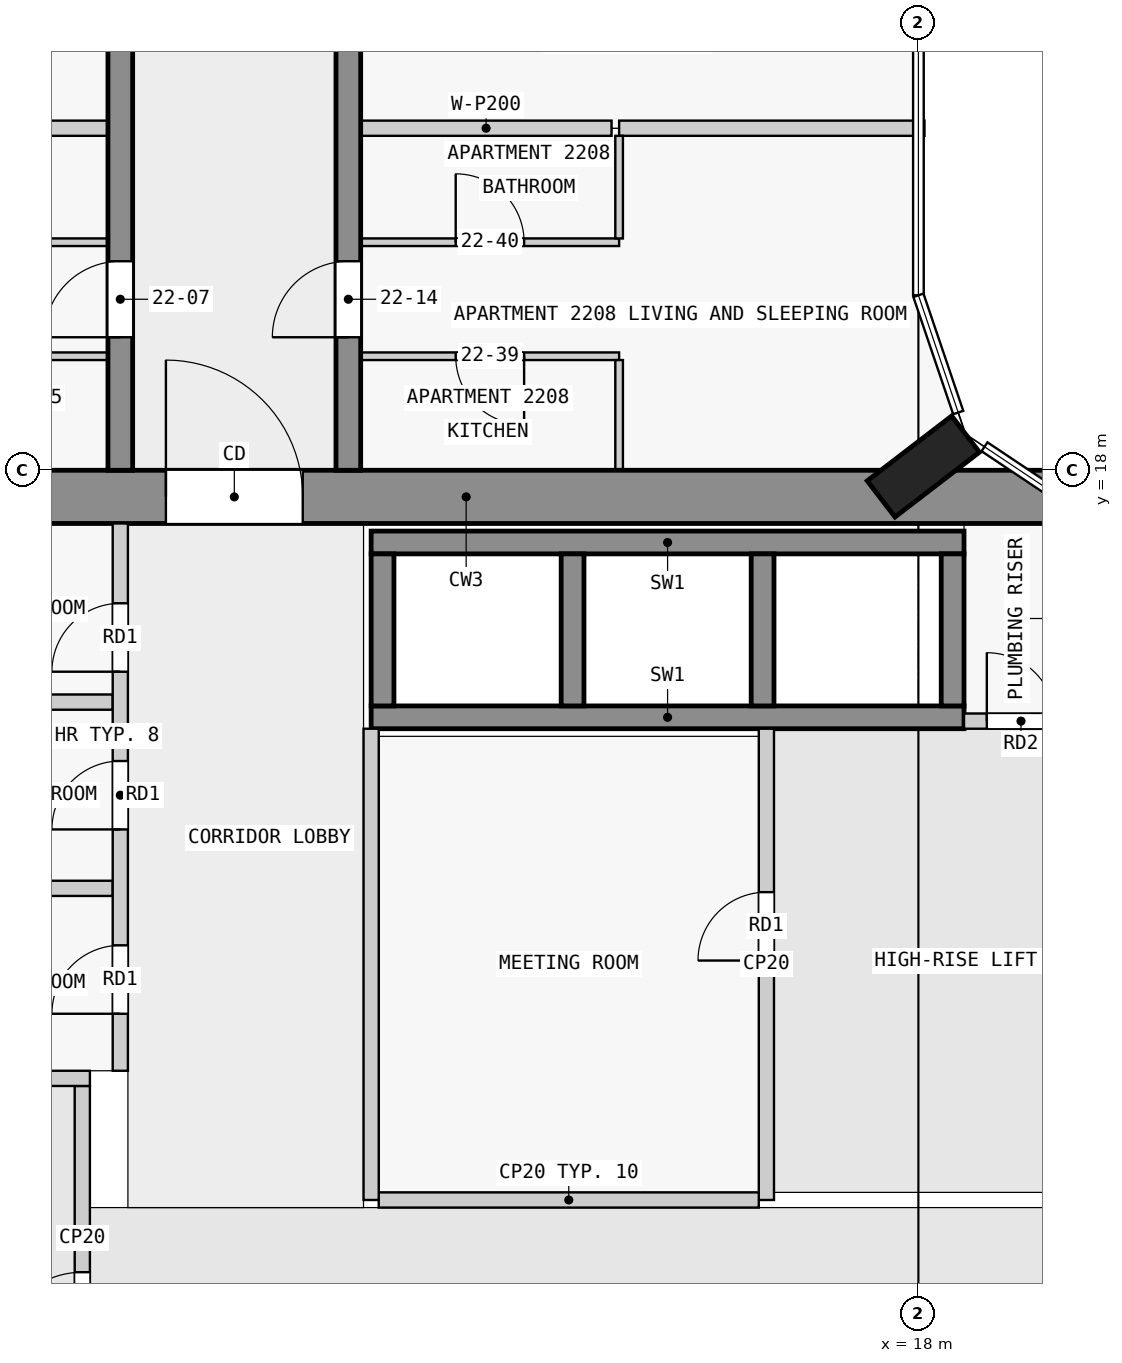
"""IFC4 building model, lengths in metres.
Left out: names, types, materials, properties, quantities, classifications, styles, units other than length and angle.
Written with IfcOpenShell. Run it as: python <this file> out.ifc"""

import sys

from ifc_helpers import new_model, si_unit, direction, frame, frame_2d, origin, origin_2d, place, context, subcontext, project, spatial, rectangle, extrude, element, fill, save


model = new_model("IFC4")
c1 = context("Model", 3, precision=1e-05, world=origin(), true_north=direction((0.0, 1.0)))
c2 = subcontext(c1, "Body", "Model", "MODEL_VIEW")
j1 = project(units=[si_unit("LENGTHUNIT", "METRE"), si_unit("PLANEANGLEUNIT", "RADIAN")], contexts=[c1])
p1 = place(None, origin())
s1 = spatial("IfcSite", under=j1, at=p1, CompositionType="ELEMENT")
p2 = place(p1, origin())
s2 = spatial("IfcBuilding", under=s1, at=p2, CompositionType="ELEMENT")
p3 = place(p2, frame((0.0, 0.0, 88.8)))
s3 = spatial("IfcBuildingStorey", under=s2, at=p3, CompositionType="ELEMENT", Elevation=88.8)
p4 = place(p3, frame((18.065, 18.05, 0.0), z_axis=(0.0, 0.0, 1.0), x_axis=(-0.608810846443, 0.793315418515, 0.0)))
e1 = element("IfcColumn", 1, at=p4, inside=s3, PredefinedType="COLUMN", context=c2, shape_type="SweptSolid", body=[
    extrude(rectangle(XDim=0.6, YDim=1.4, at=origin_2d()), origin(), (0.0, 0.0, 1.0), 3.5),
])
p5 = place(p3, frame((1.6, 17.65, 0.0), z_axis=(0.0, 0.0, 1.0), x_axis=(1.0, 0.0, 0.0)))
e2 = element("IfcWall", 2, at=p5, inside=s3, PredefinedType="SHEAR", context=c2, shape_type="SweptSolid", body=[
    extrude(rectangle(XDim=20.9, YDim=0.7, at=frame_2d((10.45, 0.0))), origin(), (0.0, 0.0, 1.0), 3.25),
])
p6 = place(p5, frame((6.5, 0.0, 0.0)))
e3 = element("IfcOpeningElement", 3, at=p6, cuts=e2, PredefinedType="OPENING", context=c2, shape_type="SweptSolid", body=[
    extrude(rectangle(XDim=1.8, YDim=2.1, at=frame_2d((0.9, 1.05))), frame((0.0, 0.36, 0.0), z_axis=(0.0, -1.0, 0.0), x_axis=(1.0, 0.0, 0.0)), (0.0, 0.0, 1.0), 0.72),
])
for number, where, z_axis, x_axis in (
    (4, (10.8, 17.05, 0.0), (0.0, 0.0, 1.0), (1.0, 0.0, 0.0)),
    (5, (10.8, 14.75, 0.0), (0.0, 0.0, 1.0), (1.0, 0.0, 0.0)),
):
    element("IfcWall", number, at=place(p3, frame(where, z_axis=z_axis, x_axis=x_axis)), inside=s3, PredefinedType="SHEAR", context=c2, shape_type="SweptSolid", body=[
        extrude(rectangle(XDim=7.8, YDim=0.3, at=frame_2d((3.9, 0.0))), origin(), (0.0, 0.0, 1.0), 3.25),
    ])
for number, where, z_axis, x_axis in (
    (6, (10.95, 14.9, 0.0), (0.0, 0.0, 1.0), (0.0, 1.0, 0.0)),
    (7, (13.45, 14.9, 0.0), (0.0, 0.0, 1.0), (0.0, 1.0, 0.0)),
    (8, (15.95, 14.9, 0.0), (0.0, 0.0, 1.0), (0.0, 1.0, 0.0)),
    (9, (18.45, 14.9, 0.0), (0.0, 0.0, 1.0), (0.0, 1.0, 0.0)),
):
    element("IfcWall", number, at=place(p3, frame(where, z_axis=z_axis, x_axis=x_axis)), inside=s3, PredefinedType="SHEAR", context=c2, shape_type="SweptSolid", body=[
        extrude(rectangle(XDim=2.0, YDim=0.3, at=frame_2d((1.0, 0.0))), origin(), (0.0, 0.0, 1.0), 3.25),
    ])
p7 = place(p3, frame((7.5, 18.0, 0.0), z_axis=(0.0, 0.0, 1.0), x_axis=(0.0, 1.0, 0.0)))
e10 = element("IfcWall", 10, at=p7, inside=s3, PredefinedType="SHEAR", context=c2, shape_type="SweptSolid", body=[
    extrude(rectangle(XDim=27.0, YDim=0.325, at=frame_2d((13.5, 0.0))), origin(), (0.0, 0.0, 1.0), 3.25),
])
p8 = place(p7, frame((1.75, 0.0, 0.0)))
e11 = element("IfcOpeningElement", 11, at=p8, cuts=e10, PredefinedType="OPENING", context=c2, shape_type="SweptSolid", body=[
    extrude(rectangle(XDim=1.0, YDim=2.1, at=frame_2d((0.5, 1.05))), frame((0.0, 0.172, 0.0), z_axis=(0.0, -1.0, 0.0), x_axis=(1.0, 0.0, 0.0)), (0.0, 0.0, 1.0), 0.345),
])
p9 = place(p7, frame((6.25, 0.0, 0.0)))
e12 = element("IfcOpeningElement", 12, at=p9, cuts=e10, PredefinedType="OPENING", context=c2, shape_type="SweptSolid", body=[
    extrude(rectangle(XDim=1.0, YDim=2.1, at=frame_2d((0.5, 1.05))), frame((0.0, 0.172, 0.0), z_axis=(0.0, -1.0, 0.0), x_axis=(1.0, 0.0, 0.0)), (0.0, 0.0, 1.0), 0.345),
])
p10 = place(p7, frame((10.85, 0.0, 0.0)))
e13 = element("IfcOpeningElement", 13, at=p10, cuts=e10, PredefinedType="OPENING", context=c2, shape_type="SweptSolid", body=[
    extrude(rectangle(XDim=0.9, YDim=2.1, at=frame_2d((0.45, 1.05))), frame((0.0, 0.172, 0.0), z_axis=(0.0, -1.0, 0.0), x_axis=(1.0, 0.0, 0.0)), (0.0, 0.0, 1.0), 0.345),
])
p11 = place(p7, frame((15.25, 0.0, 0.0)))
e14 = element("IfcOpeningElement", 14, at=p11, cuts=e10, PredefinedType="OPENING", context=c2, shape_type="SweptSolid", body=[
    extrude(rectangle(XDim=1.0, YDim=2.1, at=frame_2d((0.5, 1.05))), frame((0.0, 0.172, 0.0), z_axis=(0.0, -1.0, 0.0), x_axis=(1.0, 0.0, 0.0)), (0.0, 0.0, 1.0), 0.345),
])
p12 = place(p7, frame((19.85, 0.0, 0.0)))
e15 = element("IfcOpeningElement", 15, at=p12, cuts=e10, PredefinedType="OPENING", context=c2, shape_type="SweptSolid", body=[
    extrude(rectangle(XDim=0.9, YDim=2.1, at=frame_2d((0.45, 1.05))), frame((0.0, 0.172, 0.0), z_axis=(0.0, -1.0, 0.0), x_axis=(1.0, 0.0, 0.0)), (0.0, 0.0, 1.0), 0.345),
])
p13 = place(p7, frame((23.25, 0.0, 0.0)))
e16 = element("IfcOpeningElement", 16, at=p13, cuts=e10, PredefinedType="OPENING", context=c2, shape_type="SweptSolid", body=[
    extrude(rectangle(XDim=0.9, YDim=2.1, at=frame_2d((0.45, 1.05))), frame((0.0, 0.172, 0.0), z_axis=(0.0, -1.0, 0.0), x_axis=(1.0, 0.0, 0.0)), (0.0, 0.0, 1.0), 0.345),
])
p14 = place(p7, frame((25.45, 0.0, 0.0)))
e17 = element("IfcOpeningElement", 17, at=p14, cuts=e10, PredefinedType="OPENING", context=c2, shape_type="SweptSolid", body=[
    extrude(rectangle(XDim=1.0, YDim=2.1, at=frame_2d((0.5, 1.05))), frame((0.0, 0.172, 0.0), z_axis=(0.0, -1.0, 0.0), x_axis=(1.0, 0.0, 0.0)), (0.0, 0.0, 1.0), 0.345),
])
p15 = place(p3, frame((10.5, 18.0, 0.0), z_axis=(0.0, 0.0, 1.0), x_axis=(0.0, 1.0, 0.0)))
e18 = element("IfcWall", 18, at=p15, inside=s3, PredefinedType="SHEAR", context=c2, shape_type="SweptSolid", body=[
    extrude(rectangle(XDim=27.0, YDim=0.325, at=frame_2d((13.5, 0.0))), origin(), (0.0, 0.0, 1.0), 3.25),
])
p16 = place(p15, frame((1.75, 0.0, 0.0)))
e19 = element("IfcOpeningElement", 19, at=p16, cuts=e18, PredefinedType="OPENING", context=c2, shape_type="SweptSolid", body=[
    extrude(rectangle(XDim=1.0, YDim=2.1, at=frame_2d((0.5, 1.05))), frame((0.0, 0.172, 0.0), z_axis=(0.0, -1.0, 0.0), x_axis=(1.0, 0.0, 0.0)), (0.0, 0.0, 1.0), 0.345),
])
p17 = place(p15, frame((6.25, 0.0, 0.0)))
e20 = element("IfcOpeningElement", 20, at=p17, cuts=e18, PredefinedType="OPENING", context=c2, shape_type="SweptSolid", body=[
    extrude(rectangle(XDim=1.0, YDim=2.1, at=frame_2d((0.5, 1.05))), frame((0.0, 0.172, 0.0), z_axis=(0.0, -1.0, 0.0), x_axis=(1.0, 0.0, 0.0)), (0.0, 0.0, 1.0), 0.345),
])
p18 = place(p15, frame((13.05, 0.0, 0.0)))
e21 = element("IfcOpeningElement", 21, at=p18, cuts=e18, PredefinedType="OPENING", context=c2, shape_type="SweptSolid", body=[
    extrude(rectangle(XDim=1.0, YDim=2.1, at=frame_2d((0.5, 1.05))), frame((0.0, 0.172, 0.0), z_axis=(0.0, -1.0, 0.0), x_axis=(1.0, 0.0, 0.0)), (0.0, 0.0, 1.0), 0.345),
])
p19 = place(p15, frame((21.35, 0.0, 0.0)))
e22 = element("IfcOpeningElement", 22, at=p19, cuts=e18, PredefinedType="OPENING", context=c2, shape_type="SweptSolid", body=[
    extrude(rectangle(XDim=1.0, YDim=2.1, at=frame_2d((0.5, 1.05))), frame((0.0, 0.172, 0.0), z_axis=(0.0, -1.0, 0.0), x_axis=(1.0, 0.0, 0.0)), (0.0, 0.0, 1.0), 0.345),
])
p20 = place(p3, frame((7.0, 5.9, 0.0), z_axis=(0.0, 0.0, 1.0), x_axis=(0.0, 1.0, 0.0)))
e23 = element("IfcWall", 23, at=p20, inside=s3, PredefinedType="PARTITIONING", context=c2, shape_type="SweptSolid", body=[
    extrude(rectangle(XDim=4.0, YDim=0.2, at=frame_2d((2.0, 0.0))), origin(), (0.0, 0.0, 1.0), 3.25),
])
p21 = place(p20, frame((0.45, 0.0, 0.0)))
e24 = element("IfcOpeningElement", 24, at=p21, cuts=e23, PredefinedType="OPENING", context=c2, shape_type="SweptSolid", body=[
    extrude(rectangle(XDim=1.1, YDim=2.1, at=frame_2d((0.55, 1.05))), frame((0.0, 0.11, 0.0), z_axis=(0.0, -1.0, 0.0), x_axis=(1.0, 0.0, 0.0)), (0.0, 0.0, 1.0), 0.22),
])
p22 = place(p3, frame((5.15, 10.0, 0.0), z_axis=(0.0, 0.0, 1.0), x_axis=(1.0, 0.0, 0.0)))
e25 = element("IfcWall", 25, at=p22, inside=s3, PredefinedType="PARTITIONING", context=c2, shape_type="SweptSolid", body=[
    extrude(rectangle(XDim=1.95, YDim=0.2, at=frame_2d((0.975, 0.0))), origin(), (0.0, 0.0, 1.0), 3.25),
])
p23 = place(p3, frame((10.8, 8.4, 0.0), z_axis=(0.0, 0.0, 1.0), x_axis=(0.0, 1.0, 0.0)))
e26 = element("IfcWall", 26, at=p23, inside=s3, PredefinedType="PARTITIONING", context=c2, shape_type="SweptSolid", body=[
    extrude(rectangle(XDim=6.2, YDim=0.2, at=frame_2d((3.1, 0.0))), origin(), (0.0, 0.0, 1.0), 3.25),
])
p24 = place(p3, frame((10.9, 8.4, 0.0), z_axis=(0.0, 0.0, 1.0), x_axis=(1.0, 0.0, 0.0)))
e27 = element("IfcWall", 27, at=p24, inside=s3, PredefinedType="PARTITIONING", context=c2, shape_type="SweptSolid", body=[
    extrude(rectangle(XDim=5.0, YDim=0.2, at=frame_2d((2.5, 0.0))), origin(), (0.0, 0.0, 1.0), 3.25),
])
p25 = place(p3, frame((16.0, 8.4, 0.0), z_axis=(0.0, 0.0, 1.0), x_axis=(0.0, 1.0, 0.0)))
e28 = element("IfcWall", 28, at=p25, inside=s3, PredefinedType="PARTITIONING", context=c2, shape_type="SweptSolid", body=[
    extrude(rectangle(XDim=6.2, YDim=0.2, at=frame_2d((3.1, 0.0))), origin(), (0.0, 0.0, 1.0), 3.25),
])
p26 = place(p25, frame((3.15, 0.0, 0.0)))
e29 = element("IfcOpeningElement", 29, at=p26, cuts=e28, PredefinedType="OPENING", context=c2, shape_type="SweptSolid", body=[
    extrude(rectangle(XDim=0.9, YDim=2.1, at=frame_2d((0.45, 1.05))), frame((0.0, 0.11, 0.0), z_axis=(0.0, -1.0, 0.0), x_axis=(1.0, 0.0, 0.0)), (0.0, 0.0, 1.0), 0.22),
])
p27 = place(p3, frame((7.5, 10.1, 0.0), z_axis=(0.0, 0.0, 1.0), x_axis=(0.0, 1.0, 0.0)))
e30 = element("IfcWall", 30, at=p27, inside=s3, PredefinedType="PARTITIONING", context=c2, shape_type="SweptSolid", body=[
    extrude(rectangle(XDim=7.2, YDim=0.2, at=frame_2d((3.6, 0.0))), origin(), (0.0, 0.0, 1.0), 3.25),
])
p28 = place(p27, frame((0.75, 0.0, 0.0)))
e31 = element("IfcOpeningElement", 31, at=p28, cuts=e30, PredefinedType="OPENING", context=c2, shape_type="SweptSolid", body=[
    extrude(rectangle(XDim=0.9, YDim=2.1, at=frame_2d((0.45, 1.05))), frame((0.0, 0.11, 0.0), z_axis=(0.0, -1.0, 0.0), x_axis=(1.0, 0.0, 0.0)), (0.0, 0.0, 1.0), 0.22),
])
p29 = place(p27, frame((3.175, 0.0, 0.0)))
e32 = element("IfcOpeningElement", 32, at=p29, cuts=e30, PredefinedType="OPENING", context=c2, shape_type="SweptSolid", body=[
    extrude(rectangle(XDim=0.9, YDim=2.1, at=frame_2d((0.45, 1.05))), frame((0.0, 0.11, 0.0), z_axis=(0.0, -1.0, 0.0), x_axis=(1.0, 0.0, 0.0)), (0.0, 0.0, 1.0), 0.22),
])
p30 = place(p27, frame((5.25, 0.0, 0.0)))
e33 = element("IfcOpeningElement", 33, at=p30, cuts=e30, PredefinedType="OPENING", context=c2, shape_type="SweptSolid", body=[
    extrude(rectangle(XDim=0.9, YDim=2.1, at=frame_2d((0.45, 1.05))), frame((0.0, 0.11, 0.0), z_axis=(0.0, -1.0, 0.0), x_axis=(1.0, 0.0, 0.0)), (0.0, 0.0, 1.0), 0.22),
])
for number, where, z_axis, x_axis in (
    (34, (5.15, 12.5, 0.0), (0.0, 0.0, 1.0), (1.0, 0.0, 0.0)),
    (35, (5.15, 14.95, 0.0), (0.0, 0.0, 1.0), (1.0, 0.0, 0.0)),
):
    element("IfcWall", number, at=place(p3, frame(where, z_axis=z_axis, x_axis=x_axis)), inside=s3, PredefinedType="PARTITIONING", context=c2, shape_type="SweptSolid", body=[
        extrude(rectangle(XDim=2.25, YDim=0.2, at=frame_2d((1.125, 0.0))), origin(), (0.0, 0.0, 1.0), 3.25),
    ])
p31 = place(p3, frame((18.6, 14.7, 0.0), z_axis=(0.0, 0.0, 1.0), x_axis=(1.0, 0.0, 0.0)))
e36 = element("IfcWall", 36, at=p31, inside=s3, PredefinedType="PARTITIONING", context=c2, shape_type="SweptSolid", body=[
    extrude(rectangle(XDim=3.2, YDim=0.2, at=frame_2d((1.6, 0.0))), origin(), (0.0, 0.0, 1.0), 3.25),
])
p32 = place(p31, frame((0.3, 0.0, 0.0)))
e37 = element("IfcOpeningElement", 37, at=p32, cuts=e36, PredefinedType="OPENING", context=c2, shape_type="SweptSolid", body=[
    extrude(rectangle(XDim=0.9, YDim=2.1, at=frame_2d((0.45, 1.05))), frame((0.0, 0.11, 0.0), z_axis=(0.0, -1.0, 0.0), x_axis=(1.0, 0.0, 0.0)), (0.0, 0.0, 1.0), 0.22),
])
p33 = place(p31, frame((1.9, 0.0, 0.0)))
e38 = element("IfcOpeningElement", 38, at=p33, cuts=e36, PredefinedType="OPENING", context=c2, shape_type="SweptSolid", body=[
    extrude(rectangle(XDim=0.9, YDim=2.1, at=frame_2d((0.45, 1.05))), frame((0.0, 0.11, 0.0), z_axis=(0.0, -1.0, 0.0), x_axis=(1.0, 0.0, 0.0)), (0.0, 0.0, 1.0), 0.22),
])
p34 = place(p3, frame((7.337, 19.5, 0.0), z_axis=(0.0, 0.0, 1.0), x_axis=(-1.0, 0.0, 0.0)))
e39 = element("IfcWall", 39, at=p34, inside=s3, PredefinedType="PARTITIONING", context=c2, shape_type="SweptSolid", body=[
    extrude(rectangle(XDim=3.4, YDim=0.1, at=frame_2d((1.7, 0.0))), origin(), (0.0, 0.0, 1.0), 3.25),
])
p35 = place(p34, frame((1.25, 0.0, 0.0)))
e40 = element("IfcOpeningElement", 40, at=p35, cuts=e39, PredefinedType="OPENING", context=c2, shape_type="SweptSolid", body=[
    extrude(rectangle(XDim=0.9, YDim=2.1, at=frame_2d((0.45, 1.05))), frame((0.0, 0.06, 0.0), z_axis=(0.0, -1.0, 0.0), x_axis=(1.0, 0.0, 0.0)), (0.0, 0.0, 1.0), 0.12),
])
p36 = place(p3, frame((14.062, 19.5, 0.0), z_axis=(0.0, 0.0, 1.0), x_axis=(-1.0, 0.0, 0.0)))
e41 = element("IfcWall", 41, at=p36, inside=s3, PredefinedType="PARTITIONING", context=c2, shape_type="SweptSolid", body=[
    extrude(rectangle(XDim=3.4, YDim=0.1, at=frame_2d((1.7, 0.0))), origin(), (0.0, 0.0, 1.0), 3.25),
])
p37 = place(p36, frame((1.25, 0.0, 0.0)))
e42 = element("IfcOpeningElement", 42, at=p37, cuts=e41, PredefinedType="OPENING", context=c2, shape_type="SweptSolid", body=[
    extrude(rectangle(XDim=0.9, YDim=2.1, at=frame_2d((0.45, 1.05))), frame((0.0, 0.06, 0.0), z_axis=(0.0, -1.0, 0.0), x_axis=(1.0, 0.0, 0.0)), (0.0, 0.0, 1.0), 0.12),
])
p38 = place(p3, frame((3.938, 21.0, 0.0), z_axis=(0.0, 0.0, 1.0), x_axis=(1.0, 0.0, 0.0)))
e43 = element("IfcWall", 43, at=p38, inside=s3, PredefinedType="PARTITIONING", context=c2, shape_type="SweptSolid", body=[
    extrude(rectangle(XDim=3.4, YDim=0.1, at=frame_2d((1.7, 0.0))), origin(), (0.0, 0.0, 1.0), 3.25),
])
p39 = place(p38, frame((1.25, 0.0, 0.0)))
e44 = element("IfcOpeningElement", 44, at=p39, cuts=e43, PredefinedType="OPENING", context=c2, shape_type="SweptSolid", body=[
    extrude(rectangle(XDim=0.9, YDim=2.1, at=frame_2d((0.45, 1.05))), frame((0.0, 0.06, 0.0), z_axis=(0.0, -1.0, 0.0), x_axis=(1.0, 0.0, 0.0)), (0.0, 0.0, 1.0), 0.12),
])
p40 = place(p3, frame((10.663, 21.0, 0.0), z_axis=(0.0, 0.0, 1.0), x_axis=(1.0, 0.0, 0.0)))
e45 = element("IfcWall", 45, at=p40, inside=s3, PredefinedType="PARTITIONING", context=c2, shape_type="SweptSolid", body=[
    extrude(rectangle(XDim=3.4, YDim=0.1, at=frame_2d((1.7, 0.0))), origin(), (0.0, 0.0, 1.0), 3.25),
])
p41 = place(p40, frame((1.25, 0.0, 0.0)))
e46 = element("IfcOpeningElement", 46, at=p41, cuts=e45, PredefinedType="OPENING", context=c2, shape_type="SweptSolid", body=[
    extrude(rectangle(XDim=0.9, YDim=2.1, at=frame_2d((0.45, 1.05))), frame((0.0, 0.06, 0.0), z_axis=(0.0, -1.0, 0.0), x_axis=(1.0, 0.0, 0.0)), (0.0, 0.0, 1.0), 0.12),
])
for number, where, z_axis, x_axis in (
    (47, (7.337, 22.5, 0.0), (0.0, 0.0, 1.0), (-1.0, 0.0, 0.0)),
    (48, (13.962, 22.5, 0.0), (0.0, 0.0, 1.0), (-1.0, 0.0, 0.0)),
):
    element("IfcWall", number, at=place(p3, frame(where, z_axis=z_axis, x_axis=x_axis)), inside=s3, PredefinedType="PARTITIONING", context=c2, shape_type="SweptSolid", body=[
        extrude(rectangle(XDim=3.3, YDim=0.2, at=frame_2d((1.65, 0.0))), origin(), (0.0, 0.0, 1.0), 3.25),
    ])
p42 = place(p3, frame((14.062, 22.5, 0.0), z_axis=(0.0, 0.0, 1.0), x_axis=(1.0, 0.0, 0.0)))
e49 = element("IfcWall", 49, at=p42, inside=s3, PredefinedType="PARTITIONING", context=c2, shape_type="SweptSolid", body=[
    extrude(rectangle(XDim=4.018, YDim=0.2, at=frame_2d((2.009, 0.0))), origin(), (0.0, 0.0, 1.0), 3.25),
])
p43 = place(p3, frame((14.062, 18.0, 0.0), z_axis=(0.0, 0.0, 1.0), x_axis=(0.0, 1.0, 0.0)))
e50 = element("IfcWall", 50, at=p43, inside=s3, PredefinedType="PARTITIONING", context=c2, shape_type="SweptSolid", body=[
    extrude(rectangle(XDim=1.45, YDim=0.1, at=frame_2d((0.725, 0.0))), origin(), (0.0, 0.0, 1.0), 3.25),
])
p44 = place(p3, frame((14.062, 21.05, 0.0), z_axis=(0.0, 0.0, 1.0), x_axis=(0.0, 1.0, 0.0)))
e51 = element("IfcWall", 51, at=p44, inside=s3, PredefinedType="PARTITIONING", context=c2, shape_type="SweptSolid", body=[
    extrude(rectangle(XDim=1.35, YDim=0.1, at=frame_2d((0.675, 0.0))), origin(), (0.0, 0.0, 1.0), 3.25),
])
p45 = place(p21, origin())
e52 = element("IfcDoor", 52, at=p45, inside=s3, OperationType="SINGLE_SWING_LEFT", PredefinedType="DOOR", context=c2, shape_type="SweptSolid", body=[
    extrude(rectangle(XDim=1.1, YDim=2.1, at=frame_2d((0.55, 1.05))), frame((0.0, 0.025, 0.0), z_axis=(0.0, -1.0, 0.0), x_axis=(1.0, 0.0, 0.0)), (0.0, 0.0, 1.0), 0.05),
])
fill(e24, e52)
p46 = place(p26, origin())
e53 = element("IfcDoor", 53, at=p46, inside=s3, OperationType="SINGLE_SWING_LEFT", PredefinedType="DOOR", context=c2, shape_type="SweptSolid", body=[
    extrude(rectangle(XDim=0.9, YDim=2.1, at=frame_2d((0.45, 1.05))), frame((0.0, 0.025, 0.0), z_axis=(0.0, -1.0, 0.0), x_axis=(1.0, 0.0, 0.0)), (0.0, 0.0, 1.0), 0.05),
])
fill(e29, e53)
p47 = place(p6, origin())
e54 = element("IfcDoor", 54, at=p47, inside=s3, OperationType="DOUBLE_DOOR_SINGLE_SWING", PredefinedType="DOOR", context=c2, shape_type="SweptSolid", body=[
    extrude(rectangle(XDim=1.8, YDim=2.1, at=frame_2d((0.9, 1.05))), frame((0.0, 0.025, 0.0), z_axis=(0.0, -1.0, 0.0), x_axis=(1.0, 0.0, 0.0)), (0.0, 0.0, 1.0), 0.05),
])
fill(e3, e54)
p48 = place(p28, origin())
e55 = element("IfcDoor", 55, at=p48, inside=s3, OperationType="SINGLE_SWING_RIGHT", PredefinedType="DOOR", context=c2, shape_type="SweptSolid", body=[
    extrude(rectangle(XDim=0.9, YDim=2.1, at=frame_2d((0.45, 1.05))), frame((0.0, 0.025, 0.0), z_axis=(0.0, -1.0, 0.0), x_axis=(1.0, 0.0, 0.0)), (0.0, 0.0, 1.0), 0.05),
])
fill(e31, e55)
p49 = place(p29, origin())
e56 = element("IfcDoor", 56, at=p49, inside=s3, OperationType="SINGLE_SWING_RIGHT", PredefinedType="DOOR", context=c2, shape_type="SweptSolid", body=[
    extrude(rectangle(XDim=0.9, YDim=2.1, at=frame_2d((0.45, 1.05))), frame((0.0, 0.025, 0.0), z_axis=(0.0, -1.0, 0.0), x_axis=(1.0, 0.0, 0.0)), (0.0, 0.0, 1.0), 0.05),
])
fill(e32, e56)
p50 = place(p30, origin())
e57 = element("IfcDoor", 57, at=p50, inside=s3, OperationType="SINGLE_SWING_RIGHT", PredefinedType="DOOR", context=c2, shape_type="SweptSolid", body=[
    extrude(rectangle(XDim=0.9, YDim=2.1, at=frame_2d((0.45, 1.05))), frame((0.0, 0.025, 0.0), z_axis=(0.0, -1.0, 0.0), x_axis=(1.0, 0.0, 0.0)), (0.0, 0.0, 1.0), 0.05),
])
fill(e33, e57)
p51 = place(p32, origin())
e58 = element("IfcDoor", 58, at=p51, inside=s3, OperationType="SINGLE_SWING_LEFT", PredefinedType="DOOR", context=c2, shape_type="SweptSolid", body=[
    extrude(rectangle(XDim=0.9, YDim=2.1, at=frame_2d((0.45, 1.05))), frame((0.0, 0.025, 0.0), z_axis=(0.0, -1.0, 0.0), x_axis=(1.0, 0.0, 0.0)), (0.0, 0.0, 1.0), 0.05),
])
fill(e37, e58)
p52 = place(p8, origin())
e59 = element("IfcDoor", 59, at=p52, inside=s3, OperationType="SINGLE_SWING_LEFT", PredefinedType="DOOR", context=c2, shape_type="SweptSolid", body=[
    extrude(rectangle(XDim=1.0, YDim=2.1, at=frame_2d((0.5, 1.05))), frame((0.0, 0.025, 0.0), z_axis=(0.0, -1.0, 0.0), x_axis=(1.0, 0.0, 0.0)), (0.0, 0.0, 1.0), 0.05),
])
fill(e11, e59)
p53 = place(p16, origin())
e60 = element("IfcDoor", 60, at=p53, inside=s3, OperationType="SINGLE_SWING_LEFT", PredefinedType="DOOR", context=c2, shape_type="SweptSolid", body=[
    extrude(rectangle(XDim=1.0, YDim=2.1, at=frame_2d((0.5, 1.05))), frame((0.0, 0.025, 0.0), z_axis=(0.0, -1.0, 0.0), x_axis=(1.0, 0.0, 0.0)), (0.0, 0.0, 1.0), 0.05),
])
fill(e19, e60)
p54 = place(p37, origin())
e61 = element("IfcDoor", 61, at=p54, inside=s3, OperationType="SINGLE_SWING_LEFT", PredefinedType="DOOR", context=c2, shape_type="SweptSolid", body=[
    extrude(rectangle(XDim=0.9, YDim=2.1, at=frame_2d((0.45, 1.05))), frame((0.0, 0.025, 0.0), z_axis=(0.0, -1.0, 0.0), x_axis=(1.0, 0.0, 0.0)), (0.0, 0.0, 1.0), 0.05),
])
fill(e42, e61)
p55 = place(p41, origin())
e62 = element("IfcDoor", 62, at=p55, inside=s3, OperationType="SINGLE_SWING_LEFT", PredefinedType="DOOR", context=c2, shape_type="SweptSolid", body=[
    extrude(rectangle(XDim=0.9, YDim=2.1, at=frame_2d((0.45, 1.05))), frame((0.0, 0.025, 0.0), z_axis=(0.0, -1.0, 0.0), x_axis=(1.0, 0.0, 0.0)), (0.0, 0.0, 1.0), 0.05),
])
fill(e46, e62)
save(model, sys.argv[1])
